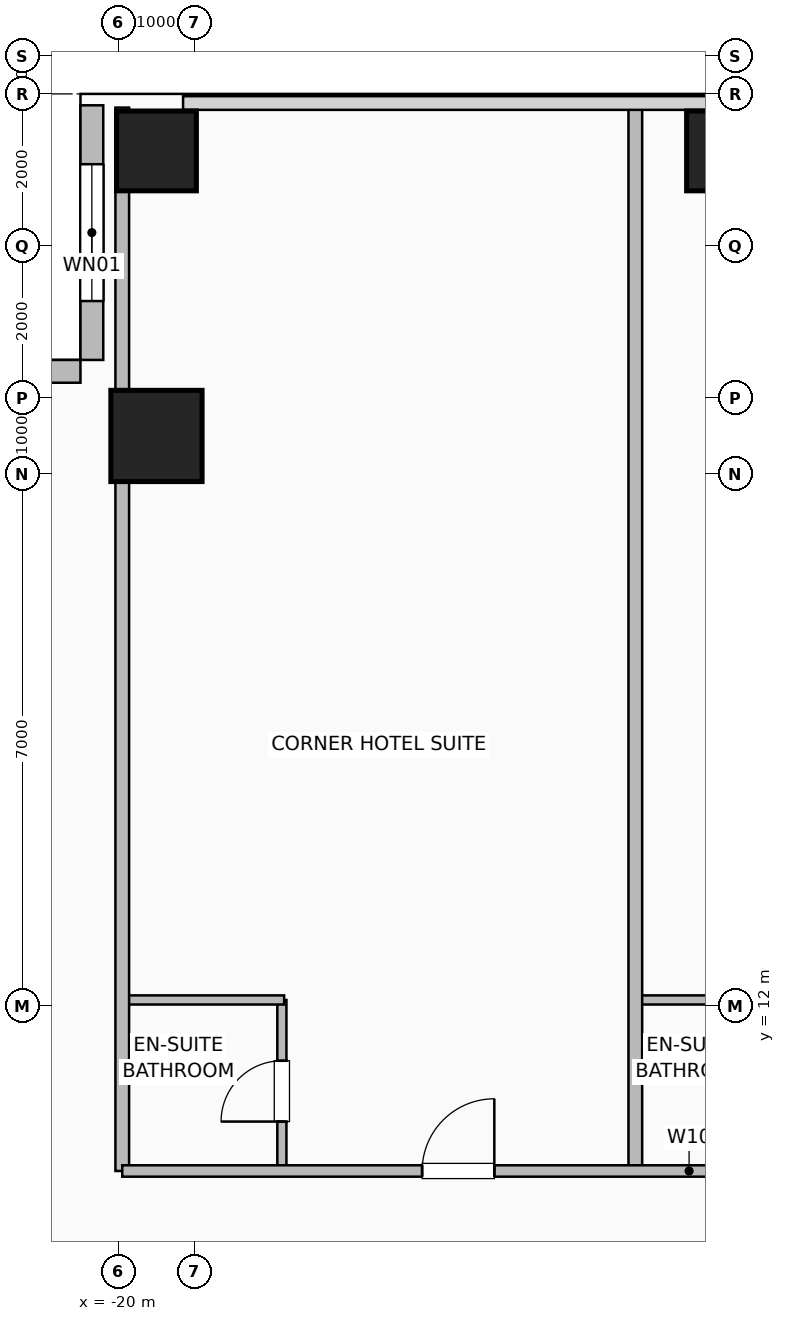
"""IFC4 building model, lengths in metres.
Left out: names, types, materials, properties, quantities, classifications, styles, units other than length and angle.
Written with IfcOpenShell. Run it as: python <this file> out.ifc"""

import sys

from ifc_helpers import new_model, si_unit, direction, frame, frame_2d, origin, origin_2d, place, context, subcontext, project, spatial, rectangle, hollow_rectangle, extrude, element, fill, save


model = new_model("IFC4")
c1 = context("Model", 3, precision=1e-05, world=origin(), true_north=direction((0.0, 1.0)))
c2 = subcontext(c1, "Body", "Model", "MODEL_VIEW")
j1 = project(units=[si_unit("LENGTHUNIT", "METRE"), si_unit("PLANEANGLEUNIT", "RADIAN")], contexts=[c1])
p1 = place(None, origin())
s1 = spatial("IfcSite", under=j1, at=p1, CompositionType="ELEMENT")
p2 = place(p1, origin())
s2 = spatial("IfcBuilding", under=s1, at=p2, CompositionType="ELEMENT")
p3 = place(p2, frame((0.0, 0.0, 30.5)))
s3 = spatial("IfcBuildingStorey", under=s2, at=p3, CompositionType="ELEMENT", Elevation=30.5)
for number, where, z_axis, x_axis in (
    (1, (-19.5, 23.25, 0.0), (0.0, 0.0, 1.0), (1.0, 0.0, 0.0)),
    (2, (-12.0, 23.25, 0.0), (0.0, 0.0, 1.0), (1.0, 0.0, 0.0)),
):
    element("IfcColumn", number, at=place(p3, frame(where, z_axis=z_axis, x_axis=x_axis)), inside=s3, PredefinedType="COLUMN", context=c2, shape_type="SweptSolid", body=[
        extrude(hollow_rectangle(XDim=1.05, YDim=1.05, WallThickness=0.05, at=origin_2d()), origin(), (0.0, 0.0, 1.0), 3.5),
    ])
p4 = place(p3, frame((-19.5, 19.5, 0.0), z_axis=(0.0, 0.0, 1.0), x_axis=(1.0, 0.0, 0.0)))
e3 = element("IfcColumn", 3, at=p4, inside=s3, PredefinedType="COLUMN", context=c2, shape_type="SweptSolid", body=[
    extrude(hollow_rectangle(XDim=1.2, YDim=1.2, WallThickness=0.055, at=origin_2d()), origin(), (0.0, 0.0, 1.0), 3.5),
])
p5 = place(p3, frame((-20.35, 23.85, 0.0), z_axis=(0.0, 0.0, 1.0), x_axis=(0.0, -1.0, 0.0)))
e4 = element("IfcWall", 4, at=p5, inside=s3, PredefinedType="SOLIDWALL", context=c2, shape_type="SweptSolid", body=[
    extrude(rectangle(XDim=3.35, YDim=0.3, at=frame_2d((1.675, 0.0))), origin(), (0.0, 0.0, 1.0), 3.25),
])
p6 = place(p5, frame((0.775, 0.0, 0.9)))
e5 = element("IfcOpeningElement", 5, at=p6, cuts=e4, PredefinedType="OPENING", context=c2, shape_type="SweptSolid", body=[
    extrude(rectangle(XDim=1.8, YDim=1.8, at=frame_2d((0.9, 0.9))), frame((0.0, 0.16, 0.0), z_axis=(0.0, -1.0, 0.0), x_axis=(1.0, 0.0, 0.0)), (0.0, 0.0, 1.0), 0.32),
])
p7 = place(p3, frame((-23.85, 20.35, 0.0), z_axis=(0.0, 0.0, 1.0), x_axis=(1.0, 0.0, 0.0)))
e6 = element("IfcWall", 6, at=p7, inside=s3, PredefinedType="SOLIDWALL", context=c2, shape_type="SweptSolid", body=[
    extrude(rectangle(XDim=3.35, YDim=0.3, at=frame_2d((1.675, 0.0))), origin(), (0.0, 0.0, 1.0), 3.25),
])
p8 = place(p3, frame((-17.85, 9.83, 0.0), z_axis=(0.0, 0.0, 1.0), x_axis=(0.0, 1.0, 0.0)))
e7 = element("IfcWall", 7, at=p8, inside=s3, PredefinedType="PLUMBINGWALL", context=c2, shape_type="SweptSolid", body=[
    extrude(rectangle(XDim=2.25, YDim=0.12, at=frame_2d((1.125, 0.0))), origin(), (0.0, 0.0, 1.0), 3.25),
])
p9 = place(p8, frame((0.65, 0.0, 0.0)))
e8 = element("IfcOpeningElement", 8, at=p9, cuts=e7, PredefinedType="OPENING", context=c2, shape_type="SweptSolid", body=[
    extrude(rectangle(XDim=0.8, YDim=2.05, at=frame_2d((0.4, 1.025))), frame((0.0, 0.07, 0.0), z_axis=(0.0, -1.0, 0.0), x_axis=(1.0, 0.0, 0.0)), (0.0, 0.0, 1.0), 0.14),
])
for number, where, z_axis, x_axis in (
    (9, (-19.92, 12.08, 0.0), (0.0, 0.0, 1.0), (1.0, 0.0, 0.0)),
    (10, (-13.17, 12.08, 0.0), (0.0, 0.0, 1.0), (1.0, 0.0, 0.0)),
):
    element("IfcWall", number, at=place(p3, frame(where, z_axis=z_axis, x_axis=x_axis)), inside=s3, PredefinedType="PLUMBINGWALL", context=c2, shape_type="SweptSolid", body=[
        extrude(rectangle(XDim=2.1, YDim=0.12, at=frame_2d((1.05, 0.0))), origin(), (0.0, 0.0, 1.0), 3.25),
    ])
for number, where, z_axis, x_axis in (
    (11, (-19.95, 9.83, 0.0), (0.0, 0.0, 1.0), (0.0, 1.0, 0.0)),
    (12, (-13.2, 9.83, 0.0), (0.0, 0.0, 1.0), (0.0, 1.0, 0.0)),
):
    element("IfcWall", number, at=place(p3, frame(where, z_axis=z_axis, x_axis=x_axis)), inside=s3, PredefinedType="PARTITIONING", context=c2, shape_type="SweptSolid", body=[
        extrude(rectangle(XDim=13.99, YDim=0.18, at=frame_2d((6.995, 0.0))), origin(), (0.0, 0.0, 1.0), 3.25),
    ])
p10 = place(p3, frame((-19.95, 9.83, 0.0), z_axis=(0.0, 0.0, 1.0), x_axis=(1.0, 0.0, 0.0)))
e13 = element("IfcWall", 13, at=p10, inside=s3, PredefinedType="PARTITIONING", context=c2, shape_type="SweptSolid", body=[
    extrude(rectangle(XDim=39.9, YDim=0.15, at=frame_2d((19.95, 0.0))), origin(), (0.0, 0.0, 1.0), 3.25),
])
p11 = place(p10, frame((3.945, 0.0, 0.0)))
e14 = element("IfcOpeningElement", 14, at=p11, cuts=e13, PredefinedType="OPENING", context=c2, shape_type="SweptSolid", body=[
    extrude(rectangle(XDim=0.95, YDim=2.08, at=frame_2d((0.475, 1.04))), frame((0.0, 0.085, 0.0), z_axis=(0.0, -1.0, 0.0), x_axis=(1.0, 0.0, 0.0)), (0.0, 0.0, 1.0), 0.17),
])
p12 = place(p10, frame((10.02, 0.0, 0.0)))
e15 = element("IfcOpeningElement", 15, at=p12, cuts=e13, PredefinedType="OPENING", context=c2, shape_type="SweptSolid", body=[
    extrude(rectangle(XDim=0.95, YDim=2.08, at=frame_2d((0.475, 1.04))), frame((0.0, 0.085, 0.0), z_axis=(0.0, -1.0, 0.0), x_axis=(1.0, 0.0, 0.0)), (0.0, 0.0, 1.0), 0.17),
])
p13 = place(p10, frame((15.42, 0.0, 0.0)))
e16 = element("IfcOpeningElement", 16, at=p13, cuts=e13, PredefinedType="OPENING", context=c2, shape_type="SweptSolid", body=[
    extrude(rectangle(XDim=0.95, YDim=2.08, at=frame_2d((0.475, 1.04))), frame((0.0, 0.085, 0.0), z_axis=(0.0, -1.0, 0.0), x_axis=(1.0, 0.0, 0.0)), (0.0, 0.0, 1.0), 0.17),
])
p14 = place(p10, frame((20.702, 0.0, 0.0)))
e17 = element("IfcOpeningElement", 17, at=p14, cuts=e13, PredefinedType="OPENING", context=c2, shape_type="SweptSolid", body=[
    extrude(rectangle(XDim=0.95, YDim=2.08, at=frame_2d((0.475, 1.04))), frame((0.0, 0.085, 0.0), z_axis=(0.0, -1.0, 0.0), x_axis=(1.0, 0.0, 0.0)), (0.0, 0.0, 1.0), 0.17),
])
p15 = place(p10, frame((26.02, 0.0, 0.0)))
e18 = element("IfcOpeningElement", 18, at=p15, cuts=e13, PredefinedType="OPENING", context=c2, shape_type="SweptSolid", body=[
    extrude(rectangle(XDim=0.95, YDim=2.08, at=frame_2d((0.475, 1.04))), frame((0.0, 0.085, 0.0), z_axis=(0.0, -1.0, 0.0), x_axis=(1.0, 0.0, 0.0)), (0.0, 0.0, 1.0), 0.17),
])
p16 = place(p10, frame((31.37, 0.0, 0.0)))
e19 = element("IfcOpeningElement", 19, at=p16, cuts=e13, PredefinedType="OPENING", context=c2, shape_type="SweptSolid", body=[
    extrude(rectangle(XDim=0.95, YDim=2.08, at=frame_2d((0.475, 1.04))), frame((0.0, 0.085, 0.0), z_axis=(0.0, -1.0, 0.0), x_axis=(1.0, 0.0, 0.0)), (0.0, 0.0, 1.0), 0.17),
])
p17 = place(p10, frame((37.245, 0.0, 0.0)))
e20 = element("IfcOpeningElement", 20, at=p17, cuts=e13, PredefinedType="OPENING", context=c2, shape_type="SweptSolid", body=[
    extrude(rectangle(XDim=0.95, YDim=2.08, at=frame_2d((0.475, 1.04))), frame((0.0, 0.085, 0.0), z_axis=(0.0, -1.0, 0.0), x_axis=(1.0, 0.0, 0.0)), (0.0, 0.0, 1.0), 0.17),
])
p18 = place(p6, origin())
e21 = element("IfcWindow", 21, at=p18, inside=s3, PartitioningType="SINGLE_PANEL", PredefinedType="WINDOW", context=c2, shape_type="SweptSolid", body=[
    extrude(rectangle(XDim=1.8, YDim=1.8, at=frame_2d((0.9, 0.9))), frame((0.0, 0.03, 0.0), z_axis=(0.0, -1.0, 0.0), x_axis=(1.0, 0.0, 0.0)), (0.0, 0.0, 1.0), 0.06),
])
fill(e5, e21)
p19 = place(p9, origin())
e22 = element("IfcDoor", 22, at=p19, inside=s3, OperationType="SINGLE_SWING_LEFT", PredefinedType="DOOR", context=c2, shape_type="SweptSolid", body=[
    extrude(rectangle(XDim=0.8, YDim=2.05, at=frame_2d((0.4, 1.025))), frame((0.0, 0.025, 0.0), z_axis=(0.0, -1.0, 0.0), x_axis=(1.0, 0.0, 0.0)), (0.0, 0.0, 1.0), 0.05),
])
fill(e8, e22)
p20 = place(p11, origin())
e23 = element("IfcDoor", 23, at=p20, inside=s3, OperationType="SINGLE_SWING_RIGHT", PredefinedType="DOOR", context=c2, shape_type="SweptSolid", body=[
    extrude(rectangle(XDim=0.95, YDim=2.08, at=frame_2d((0.475, 1.04))), frame((0.0, 0.025, 0.0), z_axis=(0.0, -1.0, 0.0), x_axis=(1.0, 0.0, 0.0)), (0.0, 0.0, 1.0), 0.05),
])
fill(e14, e23)
save(model, sys.argv[1])
